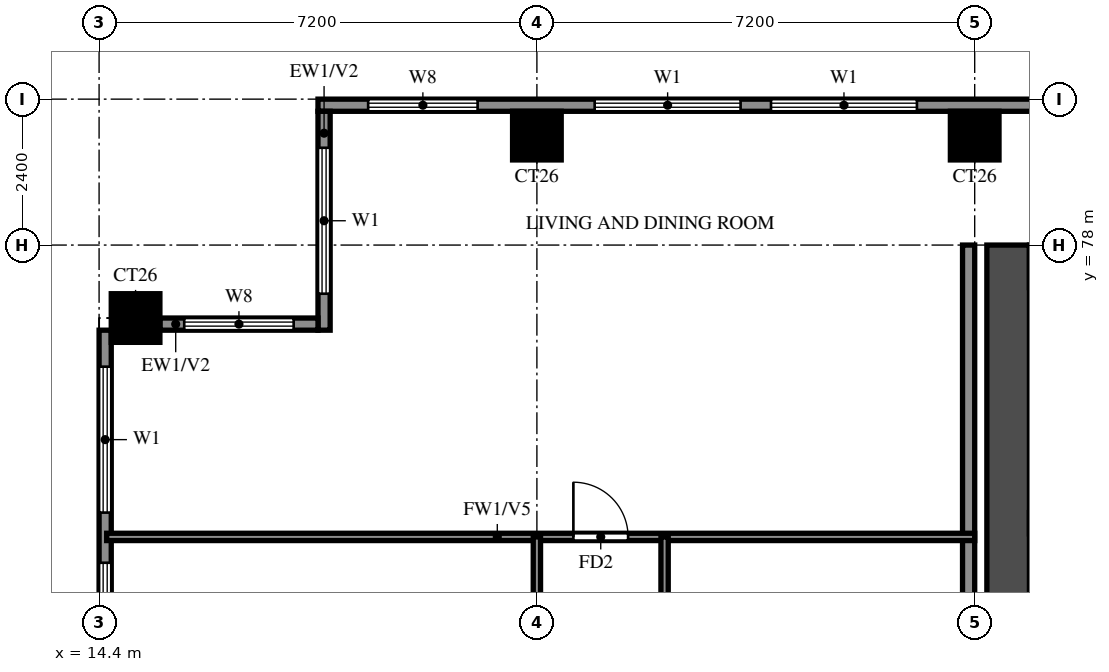
"""IFC4 building model, lengths in metres.
Left out: names, types, materials, properties, quantities, classifications, styles, units other than length and angle.
Written with IfcOpenShell. Run it as: python <this file> out.ifc"""

import sys

from ifc_helpers import new_model, si_unit, direction, frame, frame_2d, origin, origin_2d, place, context, subcontext, project, spatial, rectangle, extrude, source, transform, mapped, element, fill, save


model = new_model("IFC4")
c1 = context("Model", 3, precision=1e-05, world=origin(), true_north=direction((0.0, 1.0)))
c2 = subcontext(c1, "Body", "Model", "MODEL_VIEW")
j1 = project(units=[si_unit("LENGTHUNIT", "METRE"), si_unit("PLANEANGLEUNIT", "RADIAN")], contexts=[c1])
p1 = place(None, origin())
s1 = spatial("IfcSite", under=j1, at=p1, CompositionType="ELEMENT")
p2 = place(p1, origin())
s2 = spatial("IfcBuilding", under=s1, at=p2, CompositionType="ELEMENT")
p3 = place(p2, frame((0.0, 0.0, 185.0)))
s3 = spatial("IfcBuildingStorey", under=s2, at=p3, CompositionType="ELEMENT", Elevation=185.0)
m1 = source(origin(), c2, "Body", "SweptSolid", [
    extrude(rectangle(XDim=0.8, YDim=0.8, at=origin_2d()), origin(), (0.0, 0.0, 1.0), 3.2),
])
for number, where, z_axis, x_axis in (
    (1, (15.0, 76.8, 0.0), (0.0, 0.0, 1.0), (1.0, 0.0, 0.0)),
    (2, (21.6, 79.8, 0.0), (0.0, 0.0, 1.0), (1.0, 0.0, 0.0)),
    (3, (28.8, 79.8, 0.0), (0.0, 0.0, 1.0), (1.0, 0.0, 0.0)),
):
    element("IfcColumn", number, at=place(p3, frame(where, z_axis=z_axis, x_axis=x_axis)), inside=s3, PredefinedType="COLUMN", context=c2, shape_type="MappedRepresentation", body=[
        mapped(m1, transform((0.0, 0.0, 0.0))),
    ])
p4 = place(p3, frame((29.35, 66.1, 0.0), z_axis=(0.0, 0.0, 1.0), x_axis=(0.0, 1.0, 0.0)))
e4 = element("IfcWall", 4, at=p4, inside=s3, PredefinedType="SHEAR", context=c2, shape_type="SweptSolid", body=[
    extrude(rectangle(XDim=11.9, YDim=0.7, at=frame_2d((5.95, 0.0))), origin(), (0.0, 0.0, 1.0), 3.2),
])
p5 = place(p3, frame((82.6, 80.3, 0.0), z_axis=(0.0, 0.0, 1.0), x_axis=(-1.0, 0.0, 0.0)))
e5 = element("IfcWall", 5, at=p5, inside=s3, PredefinedType="SOLIDWALL", context=c2, shape_type="SweptSolid", body=[
    extrude(rectangle(XDim=64.6, YDim=0.2, at=frame_2d((32.3, 0.0))), origin(), (0.0, 0.0, 1.0), 3.2),
])
p6 = place(p5, frame((7.9, 0.0, 0.0)))
e6 = element("IfcOpeningElement", 6, at=p6, cuts=e5, PredefinedType="OPENING", context=c2, shape_type="SweptSolid", body=[
    extrude(rectangle(XDim=1.8, YDim=2.4, at=frame_2d((0.9, 1.2))), frame((0.0, 0.11, 0.0), z_axis=(0.0, -1.0, 0.0), x_axis=(1.0, 0.0, 0.0)), (0.0, 0.0, 1.0), 0.22),
])
p7 = place(p5, frame((54.75, 0.0, 0.6)))
e7 = element("IfcOpeningElement", 7, at=p7, cuts=e5, PredefinedType="OPENING", context=c2, shape_type="SweptSolid", body=[
    extrude(rectangle(XDim=2.4, YDim=2.4, at=frame_2d((1.2, 1.2))), frame((0.0, 0.11, 0.0), z_axis=(0.0, -1.0, 0.0), x_axis=(1.0, 0.0, 0.0)), (0.0, 0.0, 1.0), 0.22),
])
p8 = place(p5, frame((57.65, 0.0, 0.6)))
e8 = element("IfcOpeningElement", 8, at=p8, cuts=e5, PredefinedType="OPENING", context=c2, shape_type="SweptSolid", body=[
    extrude(rectangle(XDim=2.4, YDim=2.4, at=frame_2d((1.2, 1.2))), frame((0.0, 0.11, 0.0), z_axis=(0.0, -1.0, 0.0), x_axis=(1.0, 0.0, 0.0)), (0.0, 0.0, 1.0), 0.22),
])
p9 = place(p5, frame((61.975, 0.0, 0.6)))
e9 = element("IfcOpeningElement", 9, at=p9, cuts=e5, PredefinedType="OPENING", context=c2, shape_type="SweptSolid", body=[
    extrude(rectangle(XDim=1.8, YDim=2.4, at=frame_2d((0.9, 1.2))), frame((0.0, 0.11, 0.0), z_axis=(0.0, -1.0, 0.0), x_axis=(1.0, 0.0, 0.0)), (0.0, 0.0, 1.0), 0.22),
])
p10 = place(p5, frame((0.725, 0.0, 0.6)))
e10 = element("IfcOpeningElement", 10, at=p10, cuts=e5, PredefinedType="OPENING", context=c2, shape_type="SweptSolid", body=[
    extrude(rectangle(XDim=1.8, YDim=2.4, at=frame_2d((0.9, 1.2))), frame((0.0, 0.11, 0.0), z_axis=(0.0, -1.0, 0.0), x_axis=(1.0, 0.0, 0.0)), (0.0, 0.0, 1.0), 0.22),
])
p11 = place(p5, frame((3.875, 0.0, 0.6)))
e11 = element("IfcOpeningElement", 11, at=p11, cuts=e5, PredefinedType="OPENING", context=c2, shape_type="SweptSolid", body=[
    extrude(rectangle(XDim=1.8, YDim=2.4, at=frame_2d((0.9, 1.2))), frame((0.0, 0.11, 0.0), z_axis=(0.0, -1.0, 0.0), x_axis=(1.0, 0.0, 0.0)), (0.0, 0.0, 1.0), 0.22),
])
p12 = place(p5, frame((6.55, 0.0, 0.6)))
e12 = element("IfcOpeningElement", 12, at=p12, cuts=e5, PredefinedType="OPENING", context=c2, shape_type="SweptSolid", body=[
    extrude(rectangle(XDim=0.9, YDim=2.4, at=frame_2d((0.45, 1.2))), frame((0.0, 0.11, 0.0), z_axis=(0.0, -1.0, 0.0), x_axis=(1.0, 0.0, 0.0)), (0.0, 0.0, 1.0), 0.22),
])
p13 = place(p3, frame((18.1, 80.2, 0.0), z_axis=(0.0, 0.0, 1.0), x_axis=(0.0, -1.0, 0.0)))
e13 = element("IfcWall", 13, at=p13, inside=s3, PredefinedType="SOLIDWALL", context=c2, shape_type="SweptSolid", body=[
    extrude(rectangle(XDim=3.6, YDim=0.2, at=frame_2d((1.8, 0.0))), origin(), (0.0, 0.0, 1.0), 3.2),
])
p14 = place(p13, frame((0.6, 0.0, 0.6)))
e14 = element("IfcOpeningElement", 14, at=p14, cuts=e13, PredefinedType="OPENING", context=c2, shape_type="SweptSolid", body=[
    extrude(rectangle(XDim=2.4, YDim=2.4, at=frame_2d((1.2, 1.2))), frame((0.0, 0.11, 0.0), z_axis=(0.0, -1.0, 0.0), x_axis=(1.0, 0.0, 0.0)), (0.0, 0.0, 1.0), 0.22),
])
p15 = place(p3, frame((18.0, 76.7, 0.0), z_axis=(0.0, 0.0, 1.0), x_axis=(-1.0, 0.0, 0.0)))
e15 = element("IfcWall", 15, at=p15, inside=s3, PredefinedType="SOLIDWALL", context=c2, shape_type="SweptSolid", body=[
    extrude(rectangle(XDim=2.6, YDim=0.2, at=frame_2d((1.3, 0.0))), origin(), (0.0, 0.0, 1.0), 3.2),
])
p16 = place(p15, frame((0.4, 0.0, 0.6)))
e16 = element("IfcOpeningElement", 16, at=p16, cuts=e15, PredefinedType="OPENING", context=c2, shape_type="SweptSolid", body=[
    extrude(rectangle(XDim=1.8, YDim=2.4, at=frame_2d((0.9, 1.2))), frame((0.0, 0.11, 0.0), z_axis=(0.0, -1.0, 0.0), x_axis=(1.0, 0.0, 0.0)), (0.0, 0.0, 1.0), 0.22),
])
p17 = place(p3, frame((14.5, 76.6, 0.0), z_axis=(0.0, 0.0, 1.0), x_axis=(0.0, -1.0, 0.0)))
e17 = element("IfcWall", 17, at=p17, inside=s3, PredefinedType="SOLIDWALL", context=c2, shape_type="SweptSolid", body=[
    extrude(rectangle(XDim=14.2, YDim=0.2, at=frame_2d((7.1, 0.0))), origin(), (0.0, 0.0, 1.0), 3.2),
])
p18 = place(p17, frame((11.025, 0.0, 0.6)))
e18 = element("IfcOpeningElement", 18, at=p18, cuts=e17, PredefinedType="OPENING", context=c2, shape_type="SweptSolid", body=[
    extrude(rectangle(XDim=2.4, YDim=2.4, at=frame_2d((1.2, 1.2))), frame((0.0, 0.11, 0.0), z_axis=(0.0, -1.0, 0.0), x_axis=(1.0, 0.0, 0.0)), (0.0, 0.0, 1.0), 0.22),
])
p19 = place(p17, frame((7.775, 0.0, 0.6)))
e19 = element("IfcOpeningElement", 19, at=p19, cuts=e17, PredefinedType="OPENING", context=c2, shape_type="SweptSolid", body=[
    extrude(rectangle(XDim=2.4, YDim=2.4, at=frame_2d((1.2, 1.2))), frame((0.0, 0.11, 0.0), z_axis=(0.0, -1.0, 0.0), x_axis=(1.0, 0.0, 0.0)), (0.0, 0.0, 1.0), 0.22),
])
p20 = place(p17, frame((3.825, 0.0, 0.6)))
e20 = element("IfcOpeningElement", 20, at=p20, cuts=e17, PredefinedType="OPENING", context=c2, shape_type="SweptSolid", body=[
    extrude(rectangle(XDim=2.4, YDim=2.4, at=frame_2d((1.2, 1.2))), frame((0.0, 0.11, 0.0), z_axis=(0.0, -1.0, 0.0), x_axis=(1.0, 0.0, 0.0)), (0.0, 0.0, 1.0), 0.22),
])
p21 = place(p17, frame((0.6, 0.0, 0.6)))
e21 = element("IfcOpeningElement", 21, at=p21, cuts=e17, PredefinedType="OPENING", context=c2, shape_type="SweptSolid", body=[
    extrude(rectangle(XDim=2.4, YDim=2.4, at=frame_2d((1.2, 1.2))), frame((0.0, 0.11, 0.0), z_axis=(0.0, -1.0, 0.0), x_axis=(1.0, 0.0, 0.0)), (0.0, 0.0, 1.0), 0.22),
])
p22 = place(p3, frame((28.7, 62.4, 0.0), z_axis=(0.0, 0.0, 1.0), x_axis=(0.0, 1.0, 0.0)))
e22 = element("IfcWall", 22, at=p22, inside=s3, PredefinedType="SOLIDWALL", context=c2, shape_type="SweptSolid", body=[
    extrude(rectangle(XDim=15.6, YDim=0.2, at=frame_2d((7.8, 0.0))), origin(), (0.0, 0.0, 1.0), 3.2),
])
p23 = place(p3, frame((14.525, 73.2, 0.0), z_axis=(0.0, 0.0, 1.0), x_axis=(1.0, 0.0, 0.0)))
e23 = element("IfcWall", 23, at=p23, inside=s3, PredefinedType="PARTITIONING", context=c2, shape_type="SweptSolid", body=[
    extrude(rectangle(XDim=14.275, YDim=0.12, at=frame_2d((7.138, 0.0))), origin(), (0.0, 0.0, 1.0), 2.3),
])
p24 = place(p23, frame((7.675, 0.0, 0.0)))
e24 = element("IfcOpeningElement", 24, at=p24, cuts=e23, PredefinedType="OPENING", context=c2, shape_type="SweptSolid", body=[
    extrude(rectangle(XDim=0.9, YDim=2.1, at=frame_2d((0.45, 1.05))), frame((0.0, 0.07, 0.0), z_axis=(0.0, -1.0, 0.0), x_axis=(1.0, 0.0, 0.0)), (0.0, 0.0, 1.0), 0.14),
])
p25 = place(p3, frame((21.6, 48.0, 0.0), z_axis=(0.0, 0.0, 1.0), x_axis=(0.0, 1.0, 0.0)))
e25 = element("IfcWall", 25, at=p25, inside=s3, PredefinedType="PARTITIONING", context=c2, shape_type="SweptSolid", body=[
    extrude(rectangle(XDim=25.2, YDim=0.12, at=frame_2d((12.6, 0.0))), origin(), (0.0, 0.0, 1.0), 3.2),
])
p26 = place(p25, frame((1.35, 0.0, 0.0)))
e26 = element("IfcOpeningElement", 26, at=p26, cuts=e25, PredefinedType="OPENING", context=c2, shape_type="SweptSolid", body=[
    extrude(rectangle(XDim=0.9, YDim=2.1, at=frame_2d((0.45, 1.05))), frame((0.0, 0.07, 0.0), z_axis=(0.0, -1.0, 0.0), x_axis=(1.0, 0.0, 0.0)), (0.0, 0.0, 1.0), 0.14),
])
p27 = place(p25, frame((4.95, 0.0, 0.0)))
e27 = element("IfcOpeningElement", 27, at=p27, cuts=e25, PredefinedType="OPENING", context=c2, shape_type="SweptSolid", body=[
    extrude(rectangle(XDim=0.9, YDim=2.1, at=frame_2d((0.45, 1.05))), frame((0.0, 0.07, 0.0), z_axis=(0.0, -1.0, 0.0), x_axis=(1.0, 0.0, 0.0)), (0.0, 0.0, 1.0), 0.14),
])
p28 = place(p25, frame((8.25, 0.0, 0.0)))
e28 = element("IfcOpeningElement", 28, at=p28, cuts=e25, PredefinedType="OPENING", context=c2, shape_type="SweptSolid", body=[
    extrude(rectangle(XDim=1.5, YDim=2.1, at=frame_2d((0.75, 1.05))), frame((0.0, 0.07, 0.0), z_axis=(0.0, -1.0, 0.0), x_axis=(1.0, 0.0, 0.0)), (0.0, 0.0, 1.0), 0.14),
])
p29 = place(p25, frame((12.15, 0.0, 0.0)))
e29 = element("IfcOpeningElement", 29, at=p29, cuts=e25, PredefinedType="OPENING", context=c2, shape_type="SweptSolid", body=[
    extrude(rectangle(XDim=0.9, YDim=2.1, at=frame_2d((0.45, 1.05))), frame((0.0, 0.07, 0.0), z_axis=(0.0, -1.0, 0.0), x_axis=(1.0, 0.0, 0.0)), (0.0, 0.0, 1.0), 0.14),
])
p30 = place(p25, frame((15.75, 0.0, 0.0)))
e30 = element("IfcOpeningElement", 30, at=p30, cuts=e25, PredefinedType="OPENING", context=c2, shape_type="SweptSolid", body=[
    extrude(rectangle(XDim=0.9, YDim=2.1, at=frame_2d((0.45, 1.05))), frame((0.0, 0.07, 0.0), z_axis=(0.0, -1.0, 0.0), x_axis=(1.0, 0.0, 0.0)), (0.0, 0.0, 1.0), 0.14),
])
p31 = place(p25, frame((19.35, 0.0, 0.0)))
e31 = element("IfcOpeningElement", 31, at=p31, cuts=e25, PredefinedType="OPENING", context=c2, shape_type="SweptSolid", body=[
    extrude(rectangle(XDim=0.9, YDim=2.1, at=frame_2d((0.45, 1.05))), frame((0.0, 0.07, 0.0), z_axis=(0.0, -1.0, 0.0), x_axis=(1.0, 0.0, 0.0)), (0.0, 0.0, 1.0), 0.14),
])
p32 = place(p25, frame((22.95, 0.0, 0.0)))
e32 = element("IfcOpeningElement", 32, at=p32, cuts=e25, PredefinedType="OPENING", context=c2, shape_type="SweptSolid", body=[
    extrude(rectangle(XDim=0.9, YDim=2.1, at=frame_2d((0.45, 1.05))), frame((0.0, 0.07, 0.0), z_axis=(0.0, -1.0, 0.0), x_axis=(1.0, 0.0, 0.0)), (0.0, 0.0, 1.0), 0.14),
])
p33 = place(p3, frame((23.7, 61.2, 0.0), z_axis=(0.0, 0.0, 1.0), x_axis=(0.0, 1.0, 0.0)))
e33 = element("IfcWall", 33, at=p33, inside=s3, PredefinedType="PARTITIONING", context=c2, shape_type="SweptSolid", body=[
    extrude(rectangle(XDim=12.0, YDim=0.12, at=frame_2d((6.0, 0.0))), origin(), (0.0, 0.0, 1.0), 3.2),
])
p34 = place(p33, frame((5.5, 0.0, 0.0)))
e34 = element("IfcOpeningElement", 34, at=p34, cuts=e33, PredefinedType="OPENING", context=c2, shape_type="SweptSolid", body=[
    extrude(rectangle(XDim=0.8, YDim=2.1, at=frame_2d((0.4, 1.05))), frame((0.0, 0.07, 0.0), z_axis=(0.0, -1.0, 0.0), x_axis=(1.0, 0.0, 0.0)), (0.0, 0.0, 1.0), 0.14),
])
p35 = place(p33, frame((9.125, 0.0, 0.0)))
e35 = element("IfcOpeningElement", 35, at=p35, cuts=e33, PredefinedType="OPENING", context=c2, shape_type="SweptSolid", body=[
    extrude(rectangle(XDim=0.9, YDim=2.1, at=frame_2d((0.45, 1.05))), frame((0.0, 0.07, 0.0), z_axis=(0.0, -1.0, 0.0), x_axis=(1.0, 0.0, 0.0)), (0.0, 0.0, 1.0), 0.14),
])
p36 = place(p7, origin())
e36 = element("IfcWindow", 36, at=p36, inside=s3, PartitioningType="DOUBLE_PANEL_VERTICAL", PredefinedType="WINDOW", context=c2, shape_type="SweptSolid", body=[
    extrude(rectangle(XDim=2.4, YDim=2.4, at=frame_2d((1.2, 1.2))), frame((0.0, 0.03, 0.0), z_axis=(0.0, -1.0, 0.0), x_axis=(1.0, 0.0, 0.0)), (0.0, 0.0, 1.0), 0.06),
])
fill(e7, e36)
p37 = place(p8, origin())
e37 = element("IfcWindow", 37, at=p37, inside=s3, PartitioningType="DOUBLE_PANEL_VERTICAL", PredefinedType="WINDOW", context=c2, shape_type="SweptSolid", body=[
    extrude(rectangle(XDim=2.4, YDim=2.4, at=frame_2d((1.2, 1.2))), frame((0.0, 0.03, 0.0), z_axis=(0.0, -1.0, 0.0), x_axis=(1.0, 0.0, 0.0)), (0.0, 0.0, 1.0), 0.06),
])
fill(e8, e37)
p38 = place(p9, origin())
e38 = element("IfcWindow", 38, at=p38, inside=s3, PartitioningType="DOUBLE_PANEL_VERTICAL", PredefinedType="WINDOW", context=c2, shape_type="SweptSolid", body=[
    extrude(rectangle(XDim=1.8, YDim=2.4, at=frame_2d((0.9, 1.2))), frame((0.0, 0.03, 0.0), z_axis=(0.0, -1.0, 0.0), x_axis=(1.0, 0.0, 0.0)), (0.0, 0.0, 1.0), 0.06),
])
fill(e9, e38)
p39 = place(p14, origin())
e39 = element("IfcWindow", 39, at=p39, inside=s3, PartitioningType="DOUBLE_PANEL_VERTICAL", PredefinedType="WINDOW", context=c2, shape_type="SweptSolid", body=[
    extrude(rectangle(XDim=2.4, YDim=2.4, at=frame_2d((1.2, 1.2))), frame((0.0, 0.03, 0.0), z_axis=(0.0, -1.0, 0.0), x_axis=(1.0, 0.0, 0.0)), (0.0, 0.0, 1.0), 0.06),
])
fill(e14, e39)
p40 = place(p16, origin())
e40 = element("IfcWindow", 40, at=p40, inside=s3, PartitioningType="DOUBLE_PANEL_VERTICAL", PredefinedType="WINDOW", context=c2, shape_type="SweptSolid", body=[
    extrude(rectangle(XDim=1.8, YDim=2.4, at=frame_2d((0.9, 1.2))), frame((0.0, 0.03, 0.0), z_axis=(0.0, -1.0, 0.0), x_axis=(1.0, 0.0, 0.0)), (0.0, 0.0, 1.0), 0.06),
])
fill(e16, e40)
p41 = place(p20, origin())
e41 = element("IfcWindow", 41, at=p41, inside=s3, PartitioningType="DOUBLE_PANEL_VERTICAL", PredefinedType="WINDOW", context=c2, shape_type="SweptSolid", body=[
    extrude(rectangle(XDim=2.4, YDim=2.4, at=frame_2d((1.2, 1.2))), frame((0.0, 0.03, 0.0), z_axis=(0.0, -1.0, 0.0), x_axis=(1.0, 0.0, 0.0)), (0.0, 0.0, 1.0), 0.06),
])
fill(e20, e41)
p42 = place(p21, origin())
e42 = element("IfcWindow", 42, at=p42, inside=s3, PartitioningType="DOUBLE_PANEL_VERTICAL", PredefinedType="WINDOW", context=c2, shape_type="SweptSolid", body=[
    extrude(rectangle(XDim=2.4, YDim=2.4, at=frame_2d((1.2, 1.2))), frame((0.0, 0.03, 0.0), z_axis=(0.0, -1.0, 0.0), x_axis=(1.0, 0.0, 0.0)), (0.0, 0.0, 1.0), 0.06),
])
fill(e21, e42)
p43 = place(p24, origin())
e43 = element("IfcDoor", 43, at=p43, inside=s3, OperationType="SINGLE_SWING_RIGHT", PredefinedType="DOOR", context=c2, shape_type="SweptSolid", body=[
    extrude(rectangle(XDim=0.9, YDim=2.1, at=frame_2d((0.45, 1.05))), frame((0.0, 0.025, 0.0), z_axis=(0.0, -1.0, 0.0), x_axis=(1.0, 0.0, 0.0)), (0.0, 0.0, 1.0), 0.05),
])
fill(e24, e43)
save(model, sys.argv[1])
